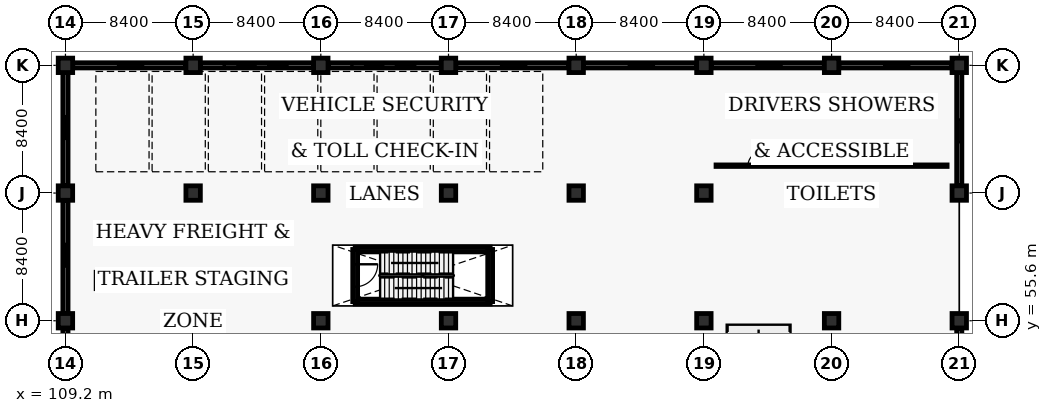
"""IFC4 building model, lengths in metres.
Left out: names, types, materials, properties, quantities, classifications, styles, units other than length and angle.
Written with IfcOpenShell. Run it as: python <this file> out.ifc"""

import sys

from ifc_helpers import new_model, si_unit, direction, frame, frame_2d, origin, origin_2d, place, context, subcontext, project, spatial, rectangle, extrude, element, fill, save


model = new_model("IFC4")
c1 = context("Model", 3, precision=1e-05, world=origin(), true_north=direction((0.0, 1.0)))
c2 = subcontext(c1, "Body", "Model", "MODEL_VIEW")
j1 = project(units=[si_unit("LENGTHUNIT", "METRE"), si_unit("PLANEANGLEUNIT", "RADIAN")], contexts=[c1])
p1 = place(None, origin())
s1 = spatial("IfcSite", under=j1, at=p1, CompositionType="ELEMENT")
p2 = place(p1, origin())
s2 = spatial("IfcBuilding", under=s1, at=p2, CompositionType="ELEMENT")
p3 = place(p2, origin())
s3 = spatial("IfcBuildingStorey", under=s2, at=p3, CompositionType="ELEMENT", Elevation=0.0)
for number, where, z_axis, x_axis in (
    (1, (109.2, 55.6, -0.46), (0.0, 0.0, 1.0), (1.0, 0.0, 0.0)),
    (2, (109.2, 64.0, -0.46), (0.0, 0.0, 1.0), (1.0, 0.0, 0.0)),
    (3, (109.2, 72.4, -0.46), (0.0, 0.0, 1.0), (1.0, 0.0, 0.0)),
    (4, (117.6, 55.6, -0.46), (0.0, 0.0, 1.0), (1.0, 0.0, 0.0)),
    (5, (117.6, 64.0, -0.46), (0.0, 0.0, 1.0), (1.0, 0.0, 0.0)),
    (6, (117.6, 72.4, -0.46), (0.0, 0.0, 1.0), (1.0, 0.0, 0.0)),
    (7, (126.0, 55.6, -0.46), (0.0, 0.0, 1.0), (1.0, 0.0, 0.0)),
    (8, (126.0, 64.0, -0.46), (0.0, 0.0, 1.0), (1.0, 0.0, 0.0)),
    (9, (126.0, 72.4, -0.46), (0.0, 0.0, 1.0), (1.0, 0.0, 0.0)),
    (10, (134.4, 55.6, -0.46), (0.0, 0.0, 1.0), (1.0, 0.0, 0.0)),
    (11, (134.4, 64.0, -0.46), (0.0, 0.0, 1.0), (1.0, 0.0, 0.0)),
    (12, (134.4, 72.4, -0.46), (0.0, 0.0, 1.0), (1.0, 0.0, 0.0)),
    (13, (142.8, 55.6, -0.46), (0.0, 0.0, 1.0), (1.0, 0.0, 0.0)),
    (14, (142.8, 64.0, -0.46), (0.0, 0.0, 1.0), (1.0, 0.0, 0.0)),
    (15, (142.8, 72.4, -0.46), (0.0, 0.0, 1.0), (1.0, 0.0, 0.0)),
    (16, (151.2, 55.6, -0.46), (0.0, 0.0, 1.0), (1.0, 0.0, 0.0)),
    (17, (151.2, 64.0, -0.46), (0.0, 0.0, 1.0), (1.0, 0.0, 0.0)),
    (18, (151.2, 72.4, -0.46), (0.0, 0.0, 1.0), (1.0, 0.0, 0.0)),
    (19, (159.6, 55.6, -0.46), (0.0, 0.0, 1.0), (1.0, 0.0, 0.0)),
    (20, (159.6, 64.0, -0.46), (0.0, 0.0, 1.0), (1.0, 0.0, 0.0)),
    (21, (159.6, 72.4, -0.46), (0.0, 0.0, 1.0), (1.0, 0.0, 0.0)),
    (22, (168.0, 55.6, -0.46), (0.0, 0.0, 1.0), (1.0, 0.0, 0.0)),
    (23, (168.0, 64.0, -0.46), (0.0, 0.0, 1.0), (1.0, 0.0, 0.0)),
    (24, (168.0, 72.4, -0.46), (0.0, 0.0, 1.0), (1.0, 0.0, 0.0)),
):
    element("IfcColumn", number, at=place(p3, frame(where, z_axis=z_axis, x_axis=x_axis)), inside=s3, PredefinedType="COLUMN", context=c2, shape_type="SweptSolid", body=[
        extrude(rectangle(XDim=0.95, YDim=0.95, at=origin_2d()), origin(), (0.0, 0.0, 1.0), 5.9),
    ])
p4 = place(p3, frame((117.125, 72.4, 0.0), z_axis=(0.0, 0.0, 1.0), x_axis=(-1.0, 0.0, 0.0)))
e25 = element("IfcWall", 25, at=p4, inside=s3, PredefinedType="SOLIDWALL", context=c2, shape_type="SweptSolid", body=[
    extrude(rectangle(XDim=7.45, YDim=0.34, at=frame_2d((3.725, 0.0))), origin(), (0.0, 0.0, 1.0), 4.545),
])
p5 = place(p4, frame((2.815, 0.0, 1.05)))
e26 = element("IfcOpeningElement", 26, at=p5, cuts=e25, PredefinedType="OPENING", context=c2, shape_type="SweptSolid", body=[
    extrude(rectangle(XDim=1.65, YDim=1.4, at=frame_2d((0.825, 0.7))), frame((0.0, 0.18, 0.0), z_axis=(0.0, -1.0, 0.0), x_axis=(1.0, 0.0, 0.0)), (0.0, 0.0, 1.0), 0.36),
])
p6 = place(p3, frame((125.525, 72.4, 0.0), z_axis=(0.0, 0.0, 1.0), x_axis=(-1.0, 0.0, 0.0)))
e27 = element("IfcWall", 27, at=p6, inside=s3, PredefinedType="SOLIDWALL", context=c2, shape_type="SweptSolid", body=[
    extrude(rectangle(XDim=7.45, YDim=0.34, at=frame_2d((3.725, 0.0))), origin(), (0.0, 0.0, 1.0), 4.545),
])
p7 = place(p6, frame((1.715, 0.0, 0.0)))
e28 = element("IfcOpeningElement", 28, at=p7, cuts=e27, PredefinedType="OPENING", context=c2, shape_type="SweptSolid", body=[
    extrude(rectangle(XDim=4.2, YDim=4.3, at=frame_2d((2.1, 2.15))), frame((0.0, 0.18, 0.0), z_axis=(0.0, -1.0, 0.0), x_axis=(1.0, 0.0, 0.0)), (0.0, 0.0, 1.0), 0.36),
])
p8 = place(p3, frame((133.925, 72.4, 0.0), z_axis=(0.0, 0.0, 1.0), x_axis=(-1.0, 0.0, 0.0)))
e29 = element("IfcWall", 29, at=p8, inside=s3, PredefinedType="SOLIDWALL", context=c2, shape_type="SweptSolid", body=[
    extrude(rectangle(XDim=7.45, YDim=0.34, at=frame_2d((3.725, 0.0))), origin(), (0.0, 0.0, 1.0), 4.545),
])
p9 = place(p8, frame((1.715, 0.0, 0.0)))
e30 = element("IfcOpeningElement", 30, at=p9, cuts=e29, PredefinedType="OPENING", context=c2, shape_type="SweptSolid", body=[
    extrude(rectangle(XDim=4.2, YDim=4.3, at=frame_2d((2.1, 2.15))), frame((0.0, 0.18, 0.0), z_axis=(0.0, -1.0, 0.0), x_axis=(1.0, 0.0, 0.0)), (0.0, 0.0, 1.0), 0.36),
])
p10 = place(p3, frame((142.325, 72.4, 0.0), z_axis=(0.0, 0.0, 1.0), x_axis=(-1.0, 0.0, 0.0)))
e31 = element("IfcWall", 31, at=p10, inside=s3, PredefinedType="SOLIDWALL", context=c2, shape_type="SweptSolid", body=[
    extrude(rectangle(XDim=7.45, YDim=0.34, at=frame_2d((3.725, 0.0))), origin(), (0.0, 0.0, 1.0), 4.545),
])
p11 = place(p10, frame((2.815, 0.0, 1.05)))
e32 = element("IfcOpeningElement", 32, at=p11, cuts=e31, PredefinedType="OPENING", context=c2, shape_type="SweptSolid", body=[
    extrude(rectangle(XDim=1.65, YDim=1.4, at=frame_2d((0.825, 0.7))), frame((0.0, 0.18, 0.0), z_axis=(0.0, -1.0, 0.0), x_axis=(1.0, 0.0, 0.0)), (0.0, 0.0, 1.0), 0.36),
])
p12 = place(p3, frame((150.725, 72.4, 0.0), z_axis=(0.0, 0.0, 1.0), x_axis=(-1.0, 0.0, 0.0)))
e33 = element("IfcWall", 33, at=p12, inside=s3, PredefinedType="SOLIDWALL", context=c2, shape_type="SweptSolid", body=[
    extrude(rectangle(XDim=7.45, YDim=0.34, at=frame_2d((3.725, 0.0))), origin(), (0.0, 0.0, 1.0), 4.545),
])
p13 = place(p12, frame((2.815, 0.0, 1.05)))
e34 = element("IfcOpeningElement", 34, at=p13, cuts=e33, PredefinedType="OPENING", context=c2, shape_type="SweptSolid", body=[
    extrude(rectangle(XDim=1.65, YDim=1.4, at=frame_2d((0.825, 0.7))), frame((0.0, 0.18, 0.0), z_axis=(0.0, -1.0, 0.0), x_axis=(1.0, 0.0, 0.0)), (0.0, 0.0, 1.0), 0.36),
])
p14 = place(p3, frame((159.125, 72.4, 0.0), z_axis=(0.0, 0.0, 1.0), x_axis=(-1.0, 0.0, 0.0)))
e35 = element("IfcWall", 35, at=p14, inside=s3, PredefinedType="SOLIDWALL", context=c2, shape_type="SweptSolid", body=[
    extrude(rectangle(XDim=7.45, YDim=0.34, at=frame_2d((3.725, 0.0))), origin(), (0.0, 0.0, 1.0), 4.545),
])
p15 = place(p14, frame((2.815, 0.0, 1.05)))
e36 = element("IfcOpeningElement", 36, at=p15, cuts=e35, PredefinedType="OPENING", context=c2, shape_type="SweptSolid", body=[
    extrude(rectangle(XDim=1.65, YDim=1.4, at=frame_2d((0.825, 0.7))), frame((0.0, 0.18, 0.0), z_axis=(0.0, -1.0, 0.0), x_axis=(1.0, 0.0, 0.0)), (0.0, 0.0, 1.0), 0.36),
])
p16 = place(p3, frame((167.525, 72.4, 0.0), z_axis=(0.0, 0.0, 1.0), x_axis=(-1.0, 0.0, 0.0)))
e37 = element("IfcWall", 37, at=p16, inside=s3, PredefinedType="SOLIDWALL", context=c2, shape_type="SweptSolid", body=[
    extrude(rectangle(XDim=7.45, YDim=0.34, at=frame_2d((3.725, 0.0))), origin(), (0.0, 0.0, 1.0), 4.545),
])
p17 = place(p16, frame((2.815, 0.0, 1.05)))
e38 = element("IfcOpeningElement", 38, at=p17, cuts=e37, PredefinedType="OPENING", context=c2, shape_type="SweptSolid", body=[
    extrude(rectangle(XDim=1.65, YDim=1.4, at=frame_2d((0.825, 0.7))), frame((0.0, 0.18, 0.0), z_axis=(0.0, -1.0, 0.0), x_axis=(1.0, 0.0, 0.0)), (0.0, 0.0, 1.0), 0.36),
])
p18 = place(p3, frame((109.2, 55.125, 0.0), z_axis=(0.0, 0.0, 1.0), x_axis=(0.0, -1.0, 0.0)))
e39 = element("IfcWall", 39, at=p18, inside=s3, PredefinedType="SOLIDWALL", context=c2, shape_type="SweptSolid", body=[
    extrude(rectangle(XDim=7.45, YDim=0.34, at=frame_2d((3.725, 0.0))), origin(), (0.0, 0.0, 1.0), 4.545),
])
p19 = place(p18, frame((2.865, 0.0, 1.35)))
e40 = element("IfcOpeningElement", 40, at=p19, cuts=e39, PredefinedType="OPENING", context=c2, shape_type="SweptSolid", body=[
    extrude(rectangle(XDim=1.5, YDim=1.1, at=frame_2d((0.75, 0.55))), frame((0.0, 0.18, 0.0), z_axis=(0.0, -1.0, 0.0), x_axis=(1.0, 0.0, 0.0)), (0.0, 0.0, 1.0), 0.36),
])
p20 = place(p3, frame((168.0, 47.675, 0.0), z_axis=(0.0, 0.0, 1.0), x_axis=(0.0, 1.0, 0.0)))
e41 = element("IfcWall", 41, at=p20, inside=s3, PredefinedType="SOLIDWALL", context=c2, shape_type="SweptSolid", body=[
    extrude(rectangle(XDim=7.45, YDim=0.34, at=frame_2d((3.725, 0.0))), origin(), (0.0, 0.0, 1.0), 4.545),
])
p21 = place(p20, frame((2.865, 0.0, 1.35)))
e42 = element("IfcOpeningElement", 42, at=p21, cuts=e41, PredefinedType="OPENING", context=c2, shape_type="SweptSolid", body=[
    extrude(rectangle(XDim=1.5, YDim=1.1, at=frame_2d((0.75, 0.55))), frame((0.0, 0.18, 0.0), z_axis=(0.0, -1.0, 0.0), x_axis=(1.0, 0.0, 0.0)), (0.0, 0.0, 1.0), 0.36),
])
p22 = place(p3, frame((109.2, 63.525, 0.0), z_axis=(0.0, 0.0, 1.0), x_axis=(0.0, -1.0, 0.0)))
e43 = element("IfcWall", 43, at=p22, inside=s3, PredefinedType="SOLIDWALL", context=c2, shape_type="SweptSolid", body=[
    extrude(rectangle(XDim=7.45, YDim=0.34, at=frame_2d((3.725, 0.0))), origin(), (0.0, 0.0, 1.0), 4.545),
])
p23 = place(p22, frame((2.865, 0.0, 1.35)))
e44 = element("IfcOpeningElement", 44, at=p23, cuts=e43, PredefinedType="OPENING", context=c2, shape_type="SweptSolid", body=[
    extrude(rectangle(XDim=1.5, YDim=1.1, at=frame_2d((0.75, 0.55))), frame((0.0, 0.18, 0.0), z_axis=(0.0, -1.0, 0.0), x_axis=(1.0, 0.0, 0.0)), (0.0, 0.0, 1.0), 0.36),
])
p24 = place(p3, frame((109.2, 71.925, 0.0), z_axis=(0.0, 0.0, 1.0), x_axis=(0.0, -1.0, 0.0)))
e45 = element("IfcWall", 45, at=p24, inside=s3, PredefinedType="SOLIDWALL", context=c2, shape_type="SweptSolid", body=[
    extrude(rectangle(XDim=7.45, YDim=0.34, at=frame_2d((3.725, 0.0))), origin(), (0.0, 0.0, 1.0), 4.545),
])
p25 = place(p24, frame((2.865, 0.0, 1.35)))
e46 = element("IfcOpeningElement", 46, at=p25, cuts=e45, PredefinedType="OPENING", context=c2, shape_type="SweptSolid", body=[
    extrude(rectangle(XDim=1.5, YDim=1.1, at=frame_2d((0.75, 0.55))), frame((0.0, 0.18, 0.0), z_axis=(0.0, -1.0, 0.0), x_axis=(1.0, 0.0, 0.0)), (0.0, 0.0, 1.0), 0.36),
])
p26 = place(p3, frame((168.0, 64.475, 0.0), z_axis=(0.0, 0.0, 1.0), x_axis=(0.0, 1.0, 0.0)))
e47 = element("IfcWall", 47, at=p26, inside=s3, PredefinedType="SOLIDWALL", context=c2, shape_type="SweptSolid", body=[
    extrude(rectangle(XDim=7.45, YDim=0.34, at=frame_2d((3.725, 0.0))), origin(), (0.0, 0.0, 1.0), 4.545),
])
p27 = place(p26, frame((2.865, 0.0, 1.35)))
e48 = element("IfcOpeningElement", 48, at=p27, cuts=e47, PredefinedType="OPENING", context=c2, shape_type="SweptSolid", body=[
    extrude(rectangle(XDim=1.5, YDim=1.1, at=frame_2d((0.75, 0.55))), frame((0.0, 0.18, 0.0), z_axis=(0.0, -1.0, 0.0), x_axis=(1.0, 0.0, 0.0)), (0.0, 0.0, 1.0), 0.36),
])
for number, where, z_axis, x_axis in (
    (49, (128.26, 56.86, 0.0), (0.0, 0.0, 1.0), (1.0, 0.0, 0.0)),
    (50, (128.26, 60.29, 0.0), (0.0, 0.0, 1.0), (1.0, 0.0, 0.0)),
):
    element("IfcWall", number, at=place(p3, frame(where, z_axis=z_axis, x_axis=x_axis)), inside=s3, PredefinedType="SHEAR", context=c2, shape_type="SweptSolid", body=[
        extrude(rectangle(XDim=8.88, YDim=0.32, at=frame_2d((4.44, 0.0))), origin(), (0.0, 0.0, 1.0), 5.44),
    ])
p28 = place(p3, frame((128.26, 60.29, 0.0), z_axis=(0.0, 0.0, 1.0), x_axis=(0.0, -1.0, 0.0)))
e51 = element("IfcWall", 51, at=p28, inside=s3, PredefinedType="SHEAR", context=c2, shape_type="SweptSolid", body=[
    extrude(rectangle(XDim=3.43, YDim=0.32, at=frame_2d((1.715, 0.0))), origin(), (0.0, 0.0, 1.0), 5.44),
])
p29 = place(p28, frame((0.975, 0.0, 0.0)))
e52 = element("IfcOpeningElement", 52, at=p29, cuts=e51, PredefinedType="OPENING", context=c2, shape_type="SweptSolid", body=[
    extrude(rectangle(XDim=1.48, YDim=2.15, at=frame_2d((0.74, 1.075))), frame((0.0, 0.17, 0.0), z_axis=(0.0, -1.0, 0.0), x_axis=(1.0, 0.0, 0.0)), (0.0, 0.0, 1.0), 0.34),
])
p30 = place(p3, frame((137.14, 56.86, 0.0), z_axis=(0.0, 0.0, 1.0), x_axis=(0.0, 1.0, 0.0)))
e53 = element("IfcWall", 53, at=p30, inside=s3, PredefinedType="SHEAR", context=c2, shape_type="SweptSolid", body=[
    extrude(rectangle(XDim=3.43, YDim=0.32, at=frame_2d((1.715, 0.0))), origin(), (0.0, 0.0, 1.0), 5.44),
])
p31 = place(p3, frame((111.31, 57.71, 0.0), z_axis=(0.0, 0.0, 1.0), x_axis=(1.0, 0.0, 0.0)))
e54 = element("IfcWall", 54, at=p31, inside=s3, PredefinedType="SOLIDWALL", context=c2, shape_type="SweptSolid", body=[
    extrude(rectangle(XDim=1.08, YDim=0.18, at=frame_2d((0.54, 0.0))), origin(), (0.0, 0.0, 1.0), 2.6),
])
p32 = place(p3, frame((112.39, 57.71, 0.0), z_axis=(0.0, 0.0, 1.0), x_axis=(0.0, 1.0, 0.0)))
e55 = element("IfcWall", 55, at=p32, inside=s3, PredefinedType="SOLIDWALL", context=c2, shape_type="SweptSolid", body=[
    extrude(rectangle(XDim=1.08, YDim=0.18, at=frame_2d((0.54, 0.0))), origin(), (0.0, 0.0, 1.0), 2.6),
])
p33 = place(p3, frame((112.39, 58.79, 0.0), z_axis=(0.0, 0.0, 1.0), x_axis=(-1.0, 0.0, 0.0)))
e56 = element("IfcWall", 56, at=p33, inside=s3, PredefinedType="SOLIDWALL", context=c2, shape_type="SweptSolid", body=[
    extrude(rectangle(XDim=1.08, YDim=0.18, at=frame_2d((0.54, 0.0))), origin(), (0.0, 0.0, 1.0), 2.6),
])
p34 = place(p3, frame((111.31, 58.79, 0.0), z_axis=(0.0, 0.0, 1.0), x_axis=(0.0, -1.0, 0.0)))
e57 = element("IfcWall", 57, at=p34, inside=s3, PredefinedType="SOLIDWALL", context=c2, shape_type="SweptSolid", body=[
    extrude(rectangle(XDim=1.08, YDim=0.18, at=frame_2d((0.54, 0.0))), origin(), (0.0, 0.0, 1.0), 2.6),
])
p35 = place(p3, frame((152.0, 65.8, 0.0), z_axis=(0.0, 0.0, 1.0), x_axis=(1.0, 0.0, 0.0)))
e58 = element("IfcWall", 58, at=p35, inside=s3, PredefinedType="PARTITIONING", context=c2, shape_type="SweptSolid", body=[
    extrude(rectangle(XDim=15.2, YDim=0.1, at=frame_2d((7.6, 0.0))), origin(), (0.0, 0.0, 1.0), 3.0),
])
p36 = place(p35, frame((2.1, 0.0, 0.0)))
e59 = element("IfcOpeningElement", 59, at=p36, cuts=e58, PredefinedType="OPENING", context=c2, shape_type="SweptSolid", body=[
    extrude(rectangle(XDim=0.9, YDim=2.06, at=frame_2d((0.45, 1.03))), frame((0.0, 0.06, 0.0), z_axis=(0.0, -1.0, 0.0), x_axis=(1.0, 0.0, 0.0)), (0.0, 0.0, 1.0), 0.12),
])
p37 = place(p35, frame((9.6, 0.0, 0.0)))
e60 = element("IfcOpeningElement", 60, at=p37, cuts=e58, PredefinedType="OPENING", context=c2, shape_type="SweptSolid", body=[
    extrude(rectangle(XDim=1.06, YDim=2.1, at=frame_2d((0.53, 1.05))), frame((0.0, 0.06, 0.0), z_axis=(0.0, -1.0, 0.0), x_axis=(1.0, 0.0, 0.0)), (0.0, 0.0, 1.0), 0.12),
])
p38 = place(p5, origin())
e61 = element("IfcWindow", 61, at=p38, inside=s3, PartitioningType="DOUBLE_PANEL_VERTICAL", PredefinedType="WINDOW", context=c2, shape_type="SweptSolid", body=[
    extrude(rectangle(XDim=1.65, YDim=1.4, at=frame_2d((0.825, 0.7))), frame((0.0, 0.03, 0.0), z_axis=(0.0, -1.0, 0.0), x_axis=(1.0, 0.0, 0.0)), (0.0, 0.0, 1.0), 0.06),
])
fill(e26, e61)
p39 = place(p7, origin())
e62 = element("IfcDoor", 62, at=p39, inside=s3, OperationType="ROLLINGUP", PredefinedType="GATE", context=c2, shape_type="SweptSolid", body=[
    extrude(rectangle(XDim=4.2, YDim=4.3, at=frame_2d((2.1, 2.15))), frame((0.0, 0.025, 0.0), z_axis=(0.0, -1.0, 0.0), x_axis=(1.0, 0.0, 0.0)), (0.0, 0.0, 1.0), 0.05),
])
fill(e28, e62)
p40 = place(p9, origin())
e63 = element("IfcDoor", 63, at=p40, inside=s3, OperationType="ROLLINGUP", PredefinedType="GATE", context=c2, shape_type="SweptSolid", body=[
    extrude(rectangle(XDim=4.2, YDim=4.3, at=frame_2d((2.1, 2.15))), frame((0.0, 0.025, 0.0), z_axis=(0.0, -1.0, 0.0), x_axis=(1.0, 0.0, 0.0)), (0.0, 0.0, 1.0), 0.05),
])
fill(e30, e63)
p41 = place(p11, origin())
e64 = element("IfcWindow", 64, at=p41, inside=s3, PartitioningType="DOUBLE_PANEL_VERTICAL", PredefinedType="WINDOW", context=c2, shape_type="SweptSolid", body=[
    extrude(rectangle(XDim=1.65, YDim=1.4, at=frame_2d((0.825, 0.7))), frame((0.0, 0.03, 0.0), z_axis=(0.0, -1.0, 0.0), x_axis=(1.0, 0.0, 0.0)), (0.0, 0.0, 1.0), 0.06),
])
fill(e32, e64)
p42 = place(p13, origin())
e65 = element("IfcWindow", 65, at=p42, inside=s3, PartitioningType="DOUBLE_PANEL_VERTICAL", PredefinedType="WINDOW", context=c2, shape_type="SweptSolid", body=[
    extrude(rectangle(XDim=1.65, YDim=1.4, at=frame_2d((0.825, 0.7))), frame((0.0, 0.03, 0.0), z_axis=(0.0, -1.0, 0.0), x_axis=(1.0, 0.0, 0.0)), (0.0, 0.0, 1.0), 0.06),
])
fill(e34, e65)
p43 = place(p15, origin())
e66 = element("IfcWindow", 66, at=p43, inside=s3, PartitioningType="DOUBLE_PANEL_VERTICAL", PredefinedType="WINDOW", context=c2, shape_type="SweptSolid", body=[
    extrude(rectangle(XDim=1.65, YDim=1.4, at=frame_2d((0.825, 0.7))), frame((0.0, 0.03, 0.0), z_axis=(0.0, -1.0, 0.0), x_axis=(1.0, 0.0, 0.0)), (0.0, 0.0, 1.0), 0.06),
])
fill(e36, e66)
p44 = place(p17, origin())
e67 = element("IfcWindow", 67, at=p44, inside=s3, PartitioningType="DOUBLE_PANEL_VERTICAL", PredefinedType="WINDOW", context=c2, shape_type="SweptSolid", body=[
    extrude(rectangle(XDim=1.65, YDim=1.4, at=frame_2d((0.825, 0.7))), frame((0.0, 0.03, 0.0), z_axis=(0.0, -1.0, 0.0), x_axis=(1.0, 0.0, 0.0)), (0.0, 0.0, 1.0), 0.06),
])
fill(e38, e67)
p45 = place(p23, origin())
e68 = element("IfcWindow", 68, at=p45, inside=s3, PartitioningType="SINGLE_PANEL", PredefinedType="WINDOW", context=c2, shape_type="SweptSolid", body=[
    extrude(rectangle(XDim=1.5, YDim=1.1, at=frame_2d((0.75, 0.55))), frame((0.0, 0.03, 0.0), z_axis=(0.0, -1.0, 0.0), x_axis=(1.0, 0.0, 0.0)), (0.0, 0.0, 1.0), 0.06),
])
fill(e44, e68)
p46 = place(p25, origin())
e69 = element("IfcWindow", 69, at=p46, inside=s3, PartitioningType="SINGLE_PANEL", PredefinedType="WINDOW", context=c2, shape_type="SweptSolid", body=[
    extrude(rectangle(XDim=1.5, YDim=1.1, at=frame_2d((0.75, 0.55))), frame((0.0, 0.03, 0.0), z_axis=(0.0, -1.0, 0.0), x_axis=(1.0, 0.0, 0.0)), (0.0, 0.0, 1.0), 0.06),
])
fill(e46, e69)
p47 = place(p27, origin())
e70 = element("IfcWindow", 70, at=p47, inside=s3, PartitioningType="SINGLE_PANEL", PredefinedType="WINDOW", context=c2, shape_type="SweptSolid", body=[
    extrude(rectangle(XDim=1.5, YDim=1.1, at=frame_2d((0.75, 0.55))), frame((0.0, 0.03, 0.0), z_axis=(0.0, -1.0, 0.0), x_axis=(1.0, 0.0, 0.0)), (0.0, 0.0, 1.0), 0.06),
])
fill(e48, e70)
p48 = place(p29, origin())
e71 = element("IfcDoor", 71, at=p48, inside=s3, OperationType="SINGLE_SWING_LEFT", PredefinedType="DOOR", context=c2, shape_type="SweptSolid", body=[
    extrude(rectangle(XDim=1.48, YDim=2.15, at=frame_2d((0.74, 1.075))), frame((0.0, 0.025, 0.0), z_axis=(0.0, -1.0, 0.0), x_axis=(1.0, 0.0, 0.0)), (0.0, 0.0, 1.0), 0.05),
])
fill(e52, e71)
p49 = place(p36, origin())
e72 = element("IfcDoor", 72, at=p49, inside=s3, OperationType="SINGLE_SWING_RIGHT", PredefinedType="DOOR", context=c2, shape_type="SweptSolid", body=[
    extrude(rectangle(XDim=0.9, YDim=2.06, at=frame_2d((0.45, 1.03))), frame((0.0, 0.025, 0.0), z_axis=(0.0, -1.0, 0.0), x_axis=(1.0, 0.0, 0.0)), (0.0, 0.0, 1.0), 0.05),
])
fill(e59, e72)
p50 = place(p37, origin())
e73 = element("IfcDoor", 73, at=p50, inside=s3, OperationType="SINGLE_SWING_LEFT", PredefinedType="DOOR", context=c2, shape_type="SweptSolid", body=[
    extrude(rectangle(XDim=1.06, YDim=2.1, at=frame_2d((0.53, 1.05))), frame((0.0, 0.025, 0.0), z_axis=(0.0, -1.0, 0.0), x_axis=(1.0, 0.0, 0.0)), (0.0, 0.0, 1.0), 0.05),
])
fill(e60, e73)
save(model, sys.argv[1])
